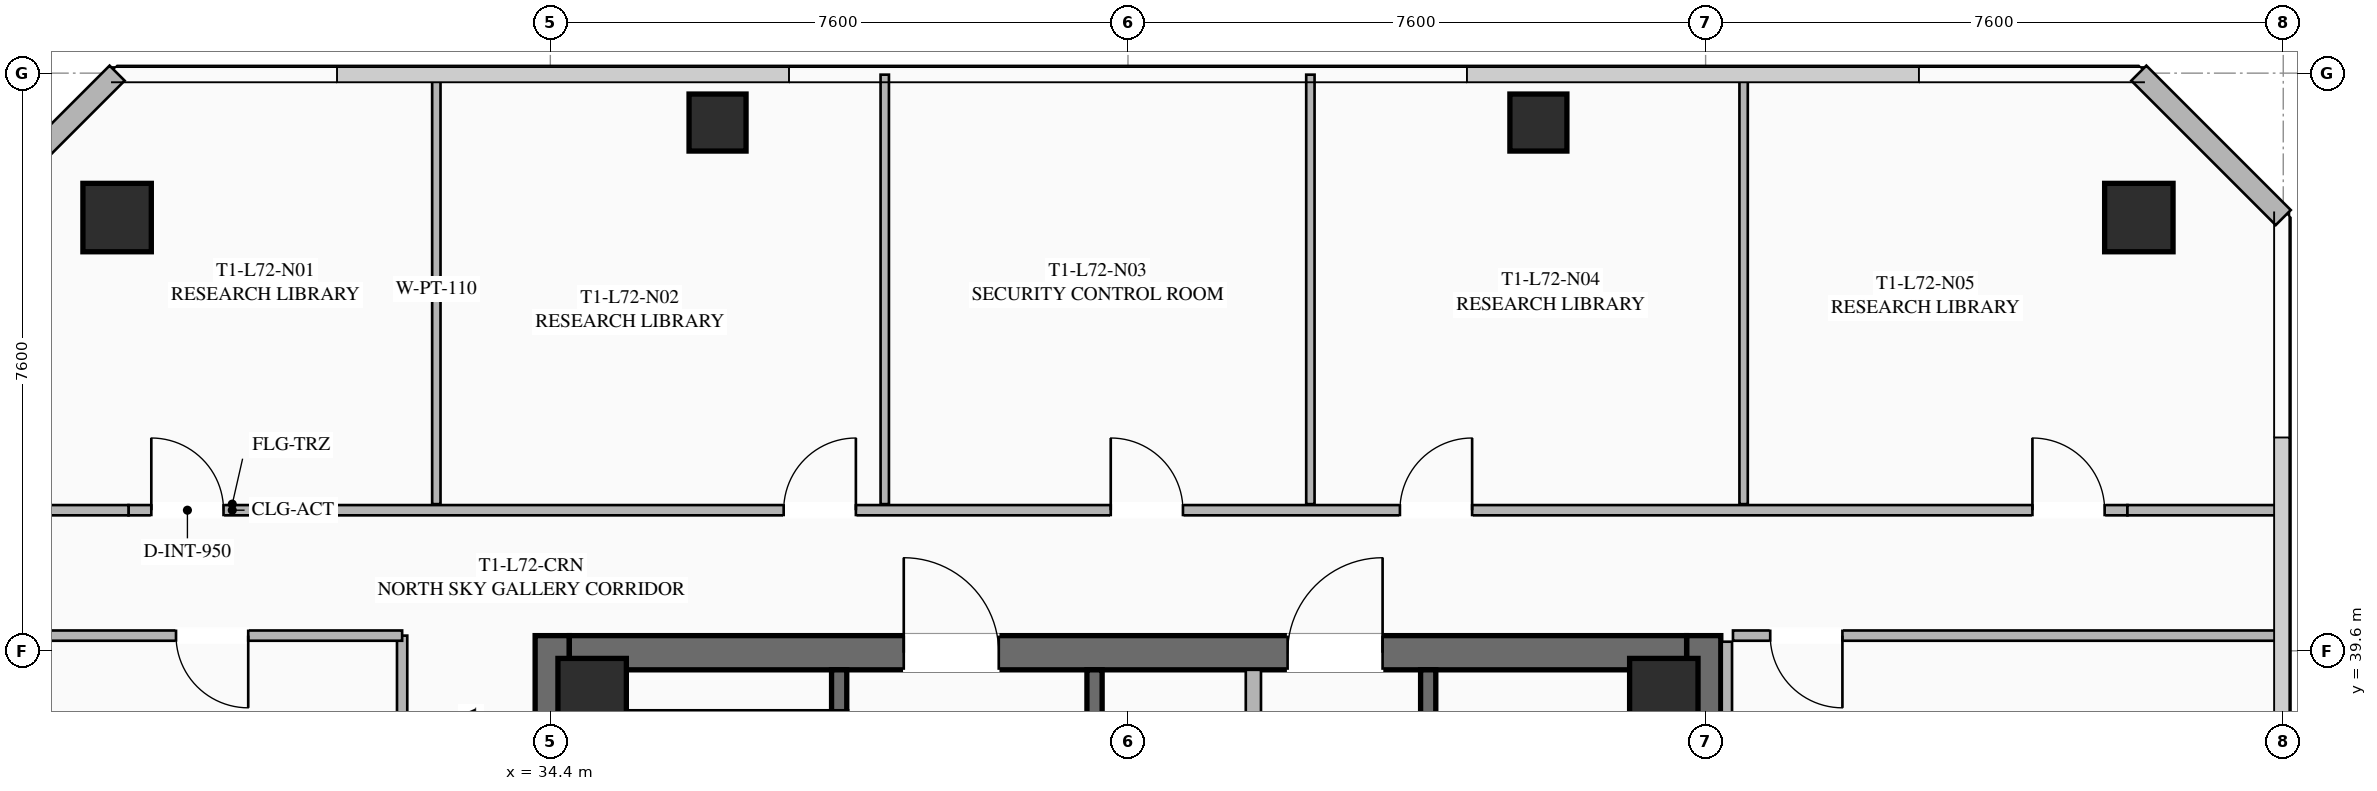
"""IFC4 building model, lengths in metres.
Left out: names, types, materials, properties, quantities, classifications, styles, units other than length and angle.
Written with IfcOpenShell. Run it as: python <this file> out.ifc"""

import sys

from ifc_helpers import new_model, si_unit, direction, frame, frame_2d, origin, origin_2d, place, context, subcontext, project, spatial, rectangle, hollow_rectangle, extrude, element, fill, save


model = new_model("IFC4")
c1 = context("Model", 3, precision=1e-05, world=origin(), true_north=direction((0.0, 1.0)))
c2 = subcontext(c1, "Body", "Model", "MODEL_VIEW")
j1 = project(units=[si_unit("LENGTHUNIT", "METRE"), si_unit("PLANEANGLEUNIT", "RADIAN")], contexts=[c1])
p1 = place(None, origin())
s1 = spatial("IfcSite", under=j1, at=p1, CompositionType="ELEMENT")
p2 = place(p1, origin())
s2 = spatial("IfcBuilding", under=s1, at=p2, CompositionType="ELEMENT")
p3 = place(p2, frame((0.0, 0.0, 266.95)))
s3 = spatial("IfcBuildingStorey", under=s2, at=p3, CompositionType="ELEMENT", Elevation=266.95)
for number, where, z_axis, x_axis in (
    (1, (34.425, 24.2, 0.0), (0.0, 0.0, 1.0), (0.0, 1.0, 0.0)),
    (2, (49.575, 39.8, 0.0), (0.0, 0.0, 1.0), (0.0, -1.0, 0.0)),
):
    element("IfcWall", number, at=place(p3, frame(where, z_axis=z_axis, x_axis=x_axis)), inside=s3, PredefinedType="SHEAR", context=c2, shape_type="SweptSolid", body=[
        extrude(rectangle(XDim=15.6, YDim=0.45, at=frame_2d((7.8, 0.0))), origin(), (0.0, 0.0, 1.0), 3.55),
    ])
p4 = place(p3, frame((34.65, 39.575, 0.0), z_axis=(0.0, 0.0, 1.0), x_axis=(1.0, 0.0, 0.0)))
e3 = element("IfcWall", 3, at=p4, inside=s3, PredefinedType="SHEAR", context=c2, shape_type="SweptSolid", body=[
    extrude(rectangle(XDim=14.7, YDim=0.45, at=frame_2d((7.35, 0.0))), origin(), (0.0, 0.0, 1.0), 3.55),
])
p5 = place(p4, frame((4.4, 0.0, 0.0)))
e4 = element("IfcOpeningElement", 4, at=p5, cuts=e3, PredefinedType="OPENING", context=c2, shape_type="SweptSolid", body=[
    extrude(rectangle(XDim=1.25, YDim=2.25, at=frame_2d((0.625, 1.125))), frame((0.0, 0.235, 0.0), z_axis=(0.0, -1.0, 0.0), x_axis=(1.0, 0.0, 0.0)), (0.0, 0.0, 1.0), 0.47),
])
p6 = place(p4, frame((9.45, 0.0, 0.0)))
e5 = element("IfcOpeningElement", 5, at=p6, cuts=e3, PredefinedType="OPENING", context=c2, shape_type="SweptSolid", body=[
    extrude(rectangle(XDim=1.25, YDim=2.25, at=frame_2d((0.625, 1.125))), frame((0.0, 0.235, 0.0), z_axis=(0.0, -1.0, 0.0), x_axis=(1.0, 0.0, 0.0)), (0.0, 0.0, 1.0), 0.47),
])
for number, where, z_axis, x_axis in (
    (6, (49.05, 39.05, 0.0), (0.0, 0.0, 1.0), (1.0, 0.0, 0.0)),
    (7, (34.95, 39.05, 0.0), (0.0, 0.0, 1.0), (1.0, 0.0, 0.0)),
    (8, (55.3, 45.3, 0.0), (0.0, 0.0, 1.0), (1.0, 0.0, 0.0)),
    (9, (28.7, 45.3, 0.0), (0.0, 0.0, 1.0), (1.0, 0.0, 0.0)),
):
    element("IfcColumn", number, at=place(p3, frame(where, z_axis=z_axis, x_axis=x_axis)), inside=s3, PredefinedType="COLUMN", context=c2, shape_type="SweptSolid", body=[
        extrude(hollow_rectangle(XDim=0.9, YDim=0.9, WallThickness=0.04, at=origin_2d()), origin(), (0.0, 0.0, 1.0), 3.37),
    ])
for number, where, z_axis, x_axis in (
    (10, (47.4, 46.55, 0.0), (0.0, 0.0, 1.0), (1.0, 0.0, 0.0)),
    (11, (36.6, 46.55, 0.0), (0.0, 0.0, 1.0), (1.0, 0.0, 0.0)),
):
    element("IfcColumn", number, at=place(p3, frame(where, z_axis=z_axis, x_axis=x_axis)), inside=s3, PredefinedType="COLUMN", context=c2, shape_type="SweptSolid", body=[
        extrude(hollow_rectangle(XDim=0.75, YDim=0.75, WallThickness=0.032, at=origin_2d()), origin(), (0.0, 0.0, 1.0), 3.37),
    ])
for number, where, z_axis, x_axis in (
    (12, (26.8, 45.3, 0.0), (0.0, 0.0, 1.0), (0.707, 0.707, 0.0)),
    (13, (55.3, 47.2, 0.0), (0.0, 0.0, 1.0), (0.707, -0.707, 0.0)),
):
    element("IfcWall", number, at=place(p3, frame(where, z_axis=z_axis, x_axis=x_axis)), inside=s3, PredefinedType="SOLIDWALL", context=c2, shape_type="SweptSolid", body=[
        extrude(rectangle(XDim=2.687, YDim=0.28, at=frame_2d((1.343, 0.0))), origin(), (0.0, 0.0, 1.0), 3.37),
    ])
p7 = place(p3, frame((38.2, 31.2, 0.0), z_axis=(0.0, 0.0, 1.0), x_axis=(0.0, 1.0, 0.0)))
e14 = element("IfcWall", 14, at=p7, inside=s3, PredefinedType="SHEAR", context=c2, shape_type="SweptSolid", body=[
    extrude(rectangle(XDim=8.15, YDim=0.2, at=frame_2d((4.075, 0.0))), origin(), (0.0, 0.0, 1.0), 3.37),
])
p8 = place(p7, frame((0.45, 0.0, 0.0)))
e15 = element("IfcOpeningElement", 15, at=p8, cuts=e14, PredefinedType="OPENING", context=c2, shape_type="SweptSolid", body=[
    extrude(rectangle(XDim=1.15, YDim=2.2, at=frame_2d((0.575, 1.1))), frame((0.0, 0.11, 0.0), z_axis=(0.0, -1.0, 0.0), x_axis=(1.0, 0.0, 0.0)), (0.0, 0.0, 1.0), 0.22),
])
p9 = place(p3, frame((41.56, 24.65, 0.0), z_axis=(0.0, 0.0, 1.0), x_axis=(0.0, 1.0, 0.0)))
e16 = element("IfcWall", 16, at=p9, inside=s3, PredefinedType="SHEAR", context=c2, shape_type="SweptSolid", body=[
    extrude(rectangle(XDim=14.7, YDim=0.2, at=frame_2d((7.35, 0.0))), origin(), (0.0, 0.0, 1.0), 3.37),
])
p10 = place(p3, frame((45.95, 39.35, 0.0), z_axis=(0.0, 0.0, 1.0), x_axis=(0.0, -1.0, 0.0)))
e17 = element("IfcWall", 17, at=p10, inside=s3, PredefinedType="SHEAR", context=c2, shape_type="SweptSolid", body=[
    extrude(rectangle(XDim=6.55, YDim=0.2, at=frame_2d((3.275, 0.0))), origin(), (0.0, 0.0, 1.0), 3.37),
])
p11 = place(p10, frame((5.075, 0.0, 0.0)))
e18 = element("IfcOpeningElement", 18, at=p11, cuts=e17, PredefinedType="OPENING", context=c2, shape_type="SweptSolid", body=[
    extrude(rectangle(XDim=1.1, YDim=2.2, at=frame_2d((0.55, 1.1))), frame((0.0, 0.11, 0.0), z_axis=(0.0, -1.0, 0.0), x_axis=(1.0, 0.0, 0.0)), (0.0, 0.0, 1.0), 0.22),
])
p12 = place(p10, frame((3.025, 0.0, 0.0)))
e19 = element("IfcOpeningElement", 19, at=p12, cuts=e17, PredefinedType="OPENING", context=c2, shape_type="SweptSolid", body=[
    extrude(rectangle(XDim=1.1, YDim=2.2, at=frame_2d((0.55, 1.1))), frame((0.0, 0.11, 0.0), z_axis=(0.0, -1.0, 0.0), x_axis=(1.0, 0.0, 0.0)), (0.0, 0.0, 1.0), 0.22),
])
p13 = place(p10, frame((1.025, 0.0, 0.0)))
e20 = element("IfcOpeningElement", 20, at=p13, cuts=e17, PredefinedType="OPENING", context=c2, shape_type="SweptSolid", body=[
    extrude(rectangle(XDim=1.1, YDim=2.2, at=frame_2d((0.55, 1.1))), frame((0.0, 0.11, 0.0), z_axis=(0.0, -1.0, 0.0), x_axis=(1.0, 0.0, 0.0)), (0.0, 0.0, 1.0), 0.22),
])
p14 = place(p3, frame((43.65, 32.35, 0.0), z_axis=(0.0, 0.0, 1.0), x_axis=(0.0, 1.0, 0.0)))
e21 = element("IfcWall", 21, at=p14, inside=s3, PredefinedType="SOLIDWALL", context=c2, shape_type="SweptSolid", body=[
    extrude(rectangle(XDim=7.0, YDim=0.2, at=frame_2d((3.5, 0.0))), origin(), (0.0, 0.0, 1.0), 2.723),
])
p15 = place(p14, frame((0.85, 0.0, 0.0)))
e22 = element("IfcOpeningElement", 22, at=p15, cuts=e21, PredefinedType="OPENING", context=c2, shape_type="SweptSolid", body=[
    extrude(rectangle(XDim=0.95, YDim=2.05, at=frame_2d((0.475, 1.025))), frame((0.0, 0.11, 0.0), z_axis=(0.0, -1.0, 0.0), x_axis=(1.0, 0.0, 0.0)), (0.0, 0.0, 1.0), 0.22),
])
p16 = place(p14, frame((4.85, 0.0, 0.0)))
e23 = element("IfcOpeningElement", 23, at=p16, cuts=e21, PredefinedType="OPENING", context=c2, shape_type="SweptSolid", body=[
    extrude(rectangle(XDim=0.95, YDim=2.05, at=frame_2d((0.475, 1.025))), frame((0.0, 0.11, 0.0), z_axis=(0.0, -1.0, 0.0), x_axis=(1.0, 0.0, 0.0)), (0.0, 0.0, 1.0), 0.22),
])
p17 = place(p3, frame((32.45, 35.4, 0.0), z_axis=(0.0, 0.0, 1.0), x_axis=(0.0, 1.0, 0.0)))
e24 = element("IfcWall", 24, at=p17, inside=s3, PredefinedType="PARTITIONING", context=c2, shape_type="SweptSolid", body=[
    extrude(rectangle(XDim=4.4, YDim=0.135, at=frame_2d((2.2, 0.0))), origin(), (0.0, 0.0, 1.0), 2.723),
])
p18 = place(p3, frame((28.85, 41.45, 0.0), z_axis=(0.0, 0.0, 1.0), x_axis=(1.0, 0.0, 0.0)))
e25 = element("IfcWall", 25, at=p18, inside=s3, PredefinedType="PARTITIONING", context=c2, shape_type="SweptSolid", body=[
    extrude(rectangle(XDim=26.3, YDim=0.135, at=frame_2d((13.15, 0.0))), origin(), (0.0, 0.0, 1.0), 2.723),
])
p19 = place(p18, frame((0.3, 0.0, 0.0)))
e26 = element("IfcOpeningElement", 26, at=p19, cuts=e25, PredefinedType="OPENING", context=c2, shape_type="SweptSolid", body=[
    extrude(rectangle(XDim=0.95, YDim=2.05, at=frame_2d((0.475, 1.025))), frame((0.0, 0.077, 0.0), z_axis=(0.0, -1.0, 0.0), x_axis=(1.0, 0.0, 0.0)), (0.0, 0.0, 1.0), 0.155),
])
p20 = place(p18, frame((8.62, 0.0, 0.0)))
e27 = element("IfcOpeningElement", 27, at=p20, cuts=e25, PredefinedType="OPENING", context=c2, shape_type="SweptSolid", body=[
    extrude(rectangle(XDim=0.95, YDim=2.05, at=frame_2d((0.475, 1.025))), frame((0.0, 0.077, 0.0), z_axis=(0.0, -1.0, 0.0), x_axis=(1.0, 0.0, 0.0)), (0.0, 0.0, 1.0), 0.155),
])
p21 = place(p18, frame((12.923, 0.0, 0.0)))
e28 = element("IfcOpeningElement", 28, at=p21, cuts=e25, PredefinedType="OPENING", context=c2, shape_type="SweptSolid", body=[
    extrude(rectangle(XDim=0.95, YDim=2.05, at=frame_2d((0.475, 1.025))), frame((0.0, 0.077, 0.0), z_axis=(0.0, -1.0, 0.0), x_axis=(1.0, 0.0, 0.0)), (0.0, 0.0, 1.0), 0.155),
])
p22 = place(p18, frame((16.728, 0.0, 0.0)))
e29 = element("IfcOpeningElement", 29, at=p22, cuts=e25, PredefinedType="OPENING", context=c2, shape_type="SweptSolid", body=[
    extrude(rectangle(XDim=0.95, YDim=2.05, at=frame_2d((0.475, 1.025))), frame((0.0, 0.077, 0.0), z_axis=(0.0, -1.0, 0.0), x_axis=(1.0, 0.0, 0.0)), (0.0, 0.0, 1.0), 0.155),
])
p23 = place(p18, frame((25.05, 0.0, 0.0)))
e30 = element("IfcOpeningElement", 30, at=p23, cuts=e25, PredefinedType="OPENING", context=c2, shape_type="SweptSolid", body=[
    extrude(rectangle(XDim=0.95, YDim=2.05, at=frame_2d((0.475, 1.025))), frame((0.0, 0.077, 0.0), z_axis=(0.0, -1.0, 0.0), x_axis=(1.0, 0.0, 0.0)), (0.0, 0.0, 1.0), 0.155),
])
for number, where, z_axis, x_axis in (
    (31, (26.82, 41.45, 0.0), (0.0, 0.0, 1.0), (1.0, 0.0, 0.0)),
    (32, (55.15, 41.45, 0.0), (0.0, 0.0, 1.0), (1.0, 0.0, 0.0)),
):
    element("IfcWall", number, at=place(p3, frame(where, z_axis=z_axis, x_axis=x_axis)), inside=s3, PredefinedType="PARTITIONING", context=c2, shape_type="SweptSolid", body=[
        extrude(rectangle(XDim=2.03, YDim=0.135, at=frame_2d((1.015, 0.0))), origin(), (0.0, 0.0, 1.0), 2.723),
    ])
for number, where, z_axis, x_axis in (
    (33, (32.9, 41.53, 0.0), (0.0, 0.0, 1.0), (0.0, 1.0, 0.0)),
    (34, (38.8, 41.53, 0.0), (0.0, 0.0, 1.0), (0.0, 1.0, 0.0)),
    (35, (44.4, 41.53, 0.0), (0.0, 0.0, 1.0), (0.0, 1.0, 0.0)),
    (36, (50.1, 41.53, 0.0), (0.0, 0.0, 1.0), (0.0, 1.0, 0.0)),
):
    element("IfcWall", number, at=place(p3, frame(where, z_axis=z_axis, x_axis=x_axis)), inside=s3, PredefinedType="PARTITIONING", context=c2, shape_type="SweptSolid", body=[
        extrude(rectangle(XDim=5.65, YDim=0.11, at=frame_2d((2.825, 0.0))), origin(), (0.0, 0.0, 1.0), 2.723),
    ])
p24 = place(p3, frame((49.88, 39.72, 0.0), z_axis=(0.0, 0.0, 1.0), x_axis=(0.0, -1.0, 0.0)))
e37 = element("IfcWall", 37, at=p24, inside=s3, PredefinedType="PARTITIONING", context=c2, shape_type="SweptSolid", body=[
    extrude(rectangle(XDim=15.44, YDim=0.135, at=frame_2d((7.72, 0.0))), origin(), (0.0, 0.0, 1.0), 2.723),
])
p25 = place(p3, frame((57.18, 39.8, 0.0), z_axis=(0.0, 0.0, 1.0), x_axis=(-1.0, 0.0, 0.0)))
e38 = element("IfcWall", 38, at=p25, inside=s3, PredefinedType="PARTITIONING", context=c2, shape_type="SweptSolid", body=[
    extrude(rectangle(XDim=7.22, YDim=0.135, at=frame_2d((3.61, 0.0))), origin(), (0.0, 0.0, 1.0), 2.723),
])
p26 = place(p25, frame((5.78, 0.0, 0.0)))
e39 = element("IfcOpeningElement", 39, at=p26, cuts=e38, PredefinedType="OPENING", context=c2, shape_type="SweptSolid", body=[
    extrude(rectangle(XDim=0.95, YDim=2.05, at=frame_2d((0.475, 1.025))), frame((0.0, 0.077, 0.0), z_axis=(0.0, -1.0, 0.0), x_axis=(1.0, 0.0, 0.0)), (0.0, 0.0, 1.0), 0.155),
])
p27 = place(p3, frame((32.45, 39.8, 0.0), z_axis=(0.0, 0.0, 1.0), x_axis=(-1.0, 0.0, 0.0)))
e40 = element("IfcWall", 40, at=p27, inside=s3, PredefinedType="PARTITIONING", context=c2, shape_type="SweptSolid", body=[
    extrude(rectangle(XDim=5.63, YDim=0.135, at=frame_2d((2.815, 0.0))), origin(), (0.0, 0.0, 1.0), 2.723),
])
p28 = place(p27, frame((2.025, 0.0, 0.0)))
e41 = element("IfcOpeningElement", 41, at=p28, cuts=e40, PredefinedType="OPENING", context=c2, shape_type="SweptSolid", body=[
    extrude(rectangle(XDim=0.95, YDim=2.05, at=frame_2d((0.475, 1.025))), frame((0.0, 0.077, 0.0), z_axis=(0.0, -1.0, 0.0), x_axis=(1.0, 0.0, 0.0)), (0.0, 0.0, 1.0), 0.155),
])
p29 = place(p5, origin())
e42 = element("IfcDoor", 42, at=p29, inside=s3, OperationType="SINGLE_SWING_LEFT", PredefinedType="DOOR", context=c2, shape_type="SweptSolid", body=[
    extrude(rectangle(XDim=1.25, YDim=2.25, at=frame_2d((0.625, 1.125))), frame((0.0, 0.025, 0.0), z_axis=(0.0, -1.0, 0.0), x_axis=(1.0, 0.0, 0.0)), (0.0, 0.0, 1.0), 0.05),
])
fill(e4, e42)
p30 = place(p6, origin())
e43 = element("IfcDoor", 43, at=p30, inside=s3, OperationType="SINGLE_SWING_RIGHT", PredefinedType="DOOR", context=c2, shape_type="SweptSolid", body=[
    extrude(rectangle(XDim=1.25, YDim=2.25, at=frame_2d((0.625, 1.125))), frame((0.0, 0.025, 0.0), z_axis=(0.0, -1.0, 0.0), x_axis=(1.0, 0.0, 0.0)), (0.0, 0.0, 1.0), 0.05),
])
fill(e5, e43)
p31 = place(p19, origin())
e44 = element("IfcDoor", 44, at=p31, inside=s3, OperationType="SINGLE_SWING_LEFT", PredefinedType="DOOR", context=c2, shape_type="SweptSolid", body=[
    extrude(rectangle(XDim=0.95, YDim=2.05, at=frame_2d((0.475, 1.025))), frame((0.0, 0.025, 0.0), z_axis=(0.0, -1.0, 0.0), x_axis=(1.0, 0.0, 0.0)), (0.0, 0.0, 1.0), 0.05),
])
fill(e26, e44)
p32 = place(p20, origin())
e45 = element("IfcDoor", 45, at=p32, inside=s3, OperationType="SINGLE_SWING_RIGHT", PredefinedType="DOOR", context=c2, shape_type="SweptSolid", body=[
    extrude(rectangle(XDim=0.95, YDim=2.05, at=frame_2d((0.475, 1.025))), frame((0.0, 0.025, 0.0), z_axis=(0.0, -1.0, 0.0), x_axis=(1.0, 0.0, 0.0)), (0.0, 0.0, 1.0), 0.05),
])
fill(e27, e45)
p33 = place(p21, origin())
e46 = element("IfcDoor", 46, at=p33, inside=s3, OperationType="SINGLE_SWING_LEFT", PredefinedType="DOOR", context=c2, shape_type="SweptSolid", body=[
    extrude(rectangle(XDim=0.95, YDim=2.05, at=frame_2d((0.475, 1.025))), frame((0.0, 0.025, 0.0), z_axis=(0.0, -1.0, 0.0), x_axis=(1.0, 0.0, 0.0)), (0.0, 0.0, 1.0), 0.05),
])
fill(e28, e46)
p34 = place(p22, origin())
e47 = element("IfcDoor", 47, at=p34, inside=s3, OperationType="SINGLE_SWING_RIGHT", PredefinedType="DOOR", context=c2, shape_type="SweptSolid", body=[
    extrude(rectangle(XDim=0.95, YDim=2.05, at=frame_2d((0.475, 1.025))), frame((0.0, 0.025, 0.0), z_axis=(0.0, -1.0, 0.0), x_axis=(1.0, 0.0, 0.0)), (0.0, 0.0, 1.0), 0.05),
])
fill(e29, e47)
p35 = place(p23, origin())
e48 = element("IfcDoor", 48, at=p35, inside=s3, OperationType="SINGLE_SWING_LEFT", PredefinedType="DOOR", context=c2, shape_type="SweptSolid", body=[
    extrude(rectangle(XDim=0.95, YDim=2.05, at=frame_2d((0.475, 1.025))), frame((0.0, 0.025, 0.0), z_axis=(0.0, -1.0, 0.0), x_axis=(1.0, 0.0, 0.0)), (0.0, 0.0, 1.0), 0.05),
])
fill(e30, e48)
p36 = place(p26, origin())
e49 = element("IfcDoor", 49, at=p36, inside=s3, OperationType="SINGLE_SWING_LEFT", PredefinedType="DOOR", context=c2, shape_type="SweptSolid", body=[
    extrude(rectangle(XDim=0.95, YDim=2.05, at=frame_2d((0.475, 1.025))), frame((0.0, 0.025, 0.0), z_axis=(0.0, -1.0, 0.0), x_axis=(1.0, 0.0, 0.0)), (0.0, 0.0, 1.0), 0.05),
])
fill(e39, e49)
p37 = place(p28, origin())
e50 = element("IfcDoor", 50, at=p37, inside=s3, OperationType="SINGLE_SWING_LEFT", PredefinedType="DOOR", context=c2, shape_type="SweptSolid", body=[
    extrude(rectangle(XDim=0.95, YDim=2.05, at=frame_2d((0.475, 1.025))), frame((0.0, 0.025, 0.0), z_axis=(0.0, -1.0, 0.0), x_axis=(1.0, 0.0, 0.0)), (0.0, 0.0, 1.0), 0.05),
])
fill(e41, e50)
save(model, sys.argv[1])
